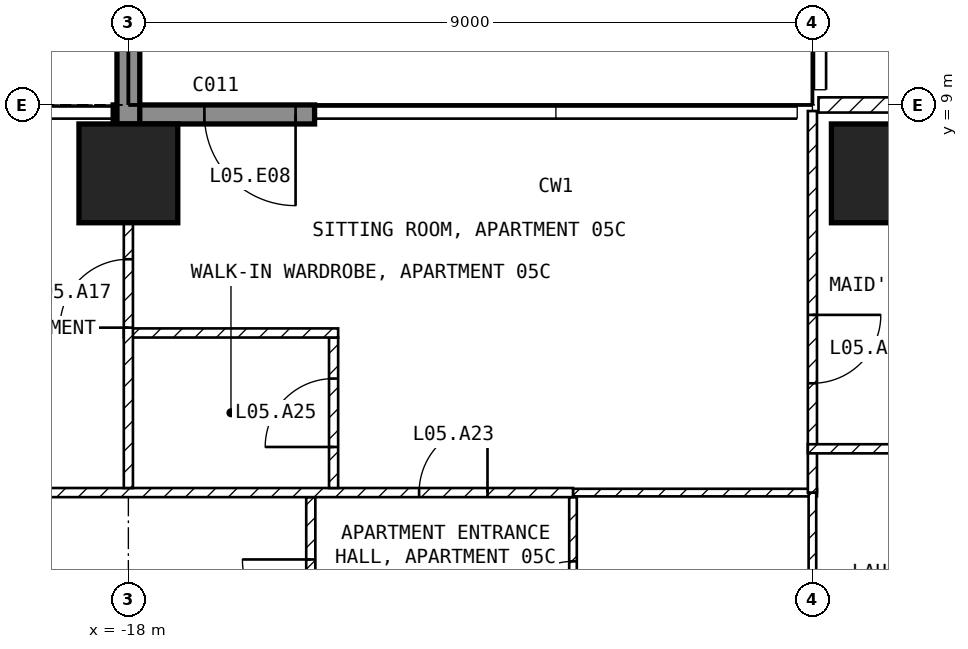
"""IFC4 building model, lengths in metres.
Left out: names, types, materials, properties, quantities, classifications, styles, units other than length and angle.
Written with IfcOpenShell. Run it as: python <this file> out.ifc"""

import sys

from ifc_helpers import new_model, si_unit, direction, frame, frame_2d, origin, origin_2d, place, context, subcontext, project, spatial, rectangle, extrude, element, fill, save


model = new_model("IFC4")
c1 = context("Model", 3, precision=1e-05, world=origin(), true_north=direction((0.0, 1.0)))
c2 = subcontext(c1, "Body", "Model", "MODEL_VIEW")
j1 = project(units=[si_unit("LENGTHUNIT", "METRE"), si_unit("PLANEANGLEUNIT", "RADIAN")], contexts=[c1])
p1 = place(None, origin())
s1 = spatial("IfcSite", under=j1, at=p1, CompositionType="ELEMENT")
p2 = place(p1, origin())
s2 = spatial("IfcBuilding", under=s1, at=p2, CompositionType="ELEMENT")
p3 = place(p2, frame((0.0, 0.0, 36.5)))
s3 = spatial("IfcBuildingStorey", under=s2, at=p3, CompositionType="ELEMENT", Elevation=36.5)
for number, where, z_axis, x_axis in (
    (1, (-18.0, 8.1, -0.25), (0.0, 0.0, 1.0), (1.0, 0.0, 0.0)),
    (2, (-8.1, 8.1, -0.25), (0.0, 0.0, 1.0), (1.0, 0.0, 0.0)),
):
    element("IfcColumn", number, at=place(p3, frame(where, z_axis=z_axis, x_axis=x_axis)), inside=s3, PredefinedType="COLUMN", context=c2, shape_type="SweptSolid", body=[
        extrude(rectangle(XDim=1.3, YDim=1.3, at=origin_2d()), origin(), (0.0, 0.0, 1.0), 3.5),
    ])
p4 = place(p3, frame((-15.55, 8.875, 0.0), z_axis=(0.0, 0.0, 1.0), x_axis=(-1.0, 0.0, 0.0)))
e3 = element("IfcWall", 3, at=p4, inside=s3, PredefinedType="SOLIDWALL", context=c2, shape_type="SweptSolid", body=[
    extrude(rectangle(XDim=2.65, YDim=0.25, at=frame_2d((1.325, 0.0))), origin(), (0.0, 0.0, 1.0), 3.25),
])
p5 = place(p4, frame((0.25, 0.0, 0.0)))
e4 = element("IfcOpeningElement", 4, at=p5, cuts=e3, PredefinedType="OPENING", context=c2, shape_type="SweptSolid", body=[
    extrude(rectangle(XDim=1.2, YDim=2.4, at=frame_2d((0.6, 1.2))), frame((0.0, 0.135, 0.0), z_axis=(0.0, -1.0, 0.0), x_axis=(1.0, 0.0, 0.0)), (0.0, 0.0, 1.0), 0.27),
])
p6 = place(p3, frame((-18.0, 8.75, 0.0), z_axis=(0.0, 0.0, 1.0), x_axis=(0.0, 1.0, 0.0)))
e5 = element("IfcWall", 5, at=p6, inside=s3, PredefinedType="SOLIDWALL", context=c2, shape_type="SweptSolid", body=[
    extrude(rectangle(XDim=2.95, YDim=0.3, at=frame_2d((1.475, 0.0))), origin(), (0.0, 0.0, 1.0), 3.25),
])
p7 = place(p3, frame((-8.92, 9.0, 0.0), z_axis=(0.0, 0.0, 1.0), x_axis=(1.0, 0.0, 0.0)))
e6 = element("IfcWall", 6, at=p7, inside=s3, PredefinedType="PARTITIONING", context=c2, shape_type="SweptSolid", body=[
    extrude(rectangle(XDim=17.84, YDim=0.2, at=frame_2d((8.92, 0.0))), origin(), (0.0, 0.0, 1.0), 3.25),
])
p8 = place(p7, frame((8.42, 0.0, 0.0)))
e7 = element("IfcOpeningElement", 7, at=p8, cuts=e6, PredefinedType="OPENING", context=c2, shape_type="SweptSolid", body=[
    extrude(rectangle(XDim=1.0, YDim=2.1, at=frame_2d((0.5, 1.05))), frame((0.0, 0.11, 0.0), z_axis=(0.0, -1.0, 0.0), x_axis=(1.0, 0.0, 0.0)), (0.0, 0.0, 1.0), 0.22),
])
p9 = place(p3, frame((-12.15, 1.3, 0.0), z_axis=(0.0, 0.0, 1.0), x_axis=(0.0, 1.0, 0.0)))
e8 = element("IfcWall", 8, at=p9, inside=s3, PredefinedType="PARTITIONING", context=c2, shape_type="SweptSolid", body=[
    extrude(rectangle(XDim=2.54, YDim=0.1, at=frame_2d((1.27, 0.0))), origin(), (0.0, 0.0, 1.0), 3.25),
])
p10 = place(p9, frame((0.845, 0.0, 0.0)))
e9 = element("IfcOpeningElement", 9, at=p10, cuts=e8, PredefinedType="OPENING", context=c2, shape_type="SweptSolid", body=[
    extrude(rectangle(XDim=0.85, YDim=2.1, at=frame_2d((0.425, 1.05))), frame((0.0, 0.06, 0.0), z_axis=(0.0, -1.0, 0.0), x_axis=(1.0, 0.0, 0.0)), (0.0, 0.0, 1.0), 0.12),
])
p11 = place(p3, frame((-12.15, 3.9, 0.0), z_axis=(0.0, 0.0, 1.0), x_axis=(1.0, 0.0, 0.0)))
e10 = element("IfcWall", 10, at=p11, inside=s3, PredefinedType="PARTITIONING", context=c2, shape_type="SweptSolid", body=[
    extrude(rectangle(XDim=3.21, YDim=0.1, at=frame_2d((1.605, 0.0))), origin(), (0.0, 0.0, 1.0), 3.25),
])
p12 = place(p3, frame((-9.0, 3.9, 0.0), z_axis=(0.0, 0.0, 1.0), x_axis=(0.0, -1.0, 0.0)))
e11 = element("IfcWall", 11, at=p12, inside=s3, PredefinedType="PARTITIONING", context=c2, shape_type="SweptSolid", body=[
    extrude(rectangle(XDim=2.6, YDim=0.1, at=frame_2d((1.3, 0.0))), origin(), (0.0, 0.0, 1.0), 3.25),
])
p13 = place(p3, frame((-15.6, 1.3, 0.0), z_axis=(0.0, 0.0, 1.0), x_axis=(0.0, 1.0, 0.0)))
e12 = element("IfcWall", 12, at=p13, inside=s3, PredefinedType="PARTITIONING", context=c2, shape_type="SweptSolid", body=[
    extrude(rectangle(XDim=2.54, YDim=0.12, at=frame_2d((1.27, 0.0))), origin(), (0.0, 0.0, 1.0), 3.25),
])
p14 = place(p13, frame((0.82, 0.0, 0.0)))
e13 = element("IfcOpeningElement", 13, at=p14, cuts=e12, PredefinedType="OPENING", context=c2, shape_type="SweptSolid", body=[
    extrude(rectangle(XDim=0.9, YDim=2.1, at=frame_2d((0.45, 1.05))), frame((0.0, 0.07, 0.0), z_axis=(0.0, -1.0, 0.0), x_axis=(1.0, 0.0, 0.0)), (0.0, 0.0, 1.0), 0.14),
])
p15 = place(p3, frame((-21.6, 3.9, 0.0), z_axis=(0.0, 0.0, 1.0), x_axis=(1.0, 0.0, 0.0)))
e14 = element("IfcWall", 14, at=p15, inside=s3, PredefinedType="PARTITIONING", context=c2, shape_type="SweptSolid", body=[
    extrude(rectangle(XDim=9.45, YDim=0.12, at=frame_2d((4.725, 0.0))), origin(), (0.0, 0.0, 1.0), 3.25),
])
p16 = place(p15, frame((7.425, 0.0, 0.0)))
e15 = element("IfcOpeningElement", 15, at=p16, cuts=e14, PredefinedType="OPENING", context=c2, shape_type="SweptSolid", body=[
    extrude(rectangle(XDim=0.9, YDim=2.1, at=frame_2d((0.45, 1.05))), frame((0.0, 0.07, 0.0), z_axis=(0.0, -1.0, 0.0), x_axis=(1.0, 0.0, 0.0)), (0.0, 0.0, 1.0), 0.14),
])
p17 = place(p15, frame((0.45, 0.0, 0.0)))
e16 = element("IfcOpeningElement", 16, at=p17, cuts=e14, PredefinedType="OPENING", context=c2, shape_type="SweptSolid", body=[
    extrude(rectangle(XDim=0.9, YDim=2.1, at=frame_2d((0.45, 1.05))), frame((0.0, 0.07, 0.0), z_axis=(0.0, -1.0, 0.0), x_axis=(1.0, 0.0, 0.0)), (0.0, 0.0, 1.0), 0.14),
])
p18 = place(p3, frame((-15.3, 3.96, 0.0), z_axis=(0.0, 0.0, 1.0), x_axis=(0.0, 1.0, 0.0)))
e17 = element("IfcWall", 17, at=p18, inside=s3, PredefinedType="PARTITIONING", context=c2, shape_type="SweptSolid", body=[
    extrude(rectangle(XDim=1.98, YDim=0.12, at=frame_2d((0.99, 0.0))), origin(), (0.0, 0.0, 1.0), 3.25),
])
p19 = place(p18, frame((0.54, 0.0, 0.0)))
e18 = element("IfcOpeningElement", 18, at=p19, cuts=e17, PredefinedType="OPENING", context=c2, shape_type="SweptSolid", body=[
    extrude(rectangle(XDim=0.9, YDim=2.1, at=frame_2d((0.45, 1.05))), frame((0.0, 0.07, 0.0), z_axis=(0.0, -1.0, 0.0), x_axis=(1.0, 0.0, 0.0)), (0.0, 0.0, 1.0), 0.14),
])
p20 = place(p3, frame((-15.24, 6.0, 0.0), z_axis=(0.0, 0.0, 1.0), x_axis=(-1.0, 0.0, 0.0)))
e19 = element("IfcWall", 19, at=p20, inside=s3, PredefinedType="PARTITIONING", context=c2, shape_type="SweptSolid", body=[
    extrude(rectangle(XDim=2.82, YDim=0.12, at=frame_2d((1.41, 0.0))), origin(), (0.0, 0.0, 1.0), 3.25),
])
p21 = place(p3, frame((-18.0, 3.96, 0.0), z_axis=(0.0, 0.0, 1.0), x_axis=(0.0, 1.0, 0.0)))
e20 = element("IfcWall", 20, at=p21, inside=s3, PredefinedType="PARTITIONING", context=c2, shape_type="SweptSolid", body=[
    extrude(rectangle(XDim=3.49, YDim=0.12, at=frame_2d((1.745, 0.0))), origin(), (0.0, 0.0, 1.0), 2.346),
])
p22 = place(p21, frame((2.11, 0.0, 0.0)))
e21 = element("IfcOpeningElement", 21, at=p22, cuts=e20, PredefinedType="OPENING", context=c2, shape_type="SweptSolid", body=[
    extrude(rectangle(XDim=0.9, YDim=2.1, at=frame_2d((0.45, 1.05))), frame((0.0, 0.07, 0.0), z_axis=(0.0, -1.0, 0.0), x_axis=(1.0, 0.0, 0.0)), (0.0, 0.0, 1.0), 0.14),
])
p23 = place(p3, frame((-9.0, 8.92, 0.0), z_axis=(0.0, 0.0, 1.0), x_axis=(0.0, -1.0, 0.0)))
e22 = element("IfcWall", 22, at=p23, inside=s3, PredefinedType="PARTITIONING", context=c2, shape_type="SweptSolid", body=[
    extrude(rectangle(XDim=5.02, YDim=0.12, at=frame_2d((2.51, 0.0))), origin(), (0.0, 0.0, 1.0), 3.25),
])
p24 = place(p23, frame((2.682, 0.0, 0.0)))
e23 = element("IfcOpeningElement", 23, at=p24, cuts=e22, PredefinedType="OPENING", context=c2, shape_type="SweptSolid", body=[
    extrude(rectangle(XDim=0.9, YDim=2.1, at=frame_2d((0.45, 1.05))), frame((0.0, 0.07, 0.0), z_axis=(0.0, -1.0, 0.0), x_axis=(1.0, 0.0, 0.0)), (0.0, 0.0, 1.0), 0.14),
])
p25 = place(p3, frame((-9.06, 4.476, 0.0), z_axis=(0.0, 0.0, 1.0), x_axis=(1.0, 0.0, 0.0)))
e24 = element("IfcWall", 24, at=p25, inside=s3, PredefinedType="PARTITIONING", context=c2, shape_type="SweptSolid", body=[
    extrude(rectangle(XDim=4.62, YDim=0.12, at=frame_2d((2.31, 0.0))), origin(), (0.0, 0.0, 1.0), 3.25),
])
p26 = place(p25, frame((1.86, 0.0, 0.0)))
e25 = element("IfcOpeningElement", 25, at=p26, cuts=e24, PredefinedType="OPENING", context=c2, shape_type="SweptSolid", body=[
    extrude(rectangle(XDim=0.9, YDim=2.1, at=frame_2d((0.45, 1.05))), frame((0.0, 0.07, 0.0), z_axis=(0.0, -1.0, 0.0), x_axis=(1.0, 0.0, 0.0)), (0.0, 0.0, 1.0), 0.14),
])
p27 = place(p5, origin())
e26 = element("IfcDoor", 26, at=p27, inside=s3, OperationType="SINGLE_SWING_LEFT", PredefinedType="DOOR", context=c2, shape_type="SweptSolid", body=[
    extrude(rectangle(XDim=1.2, YDim=2.4, at=frame_2d((0.6, 1.2))), frame((0.0, 0.025, 0.0), z_axis=(0.0, -1.0, 0.0), x_axis=(1.0, 0.0, 0.0)), (0.0, 0.0, 1.0), 0.05),
])
fill(e4, e26)
p28 = place(p22, origin())
e27 = element("IfcDoor", 27, at=p28, inside=s3, OperationType="SINGLE_SWING_LEFT", PredefinedType="DOOR", context=c2, shape_type="SweptSolid", body=[
    extrude(rectangle(XDim=0.9, YDim=2.1, at=frame_2d((0.45, 1.05))), frame((0.0, 0.025, 0.0), z_axis=(0.0, -1.0, 0.0), x_axis=(1.0, 0.0, 0.0)), (0.0, 0.0, 1.0), 0.05),
])
fill(e21, e27)
p29 = place(p14, origin())
e28 = element("IfcDoor", 28, at=p29, inside=s3, OperationType="SINGLE_SWING_RIGHT", PredefinedType="DOOR", context=c2, shape_type="SweptSolid", body=[
    extrude(rectangle(XDim=0.9, YDim=2.1, at=frame_2d((0.45, 1.05))), frame((0.0, 0.025, 0.0), z_axis=(0.0, -1.0, 0.0), x_axis=(1.0, 0.0, 0.0)), (0.0, 0.0, 1.0), 0.05),
])
fill(e13, e28)
p30 = place(p24, origin())
e29 = element("IfcDoor", 29, at=p30, inside=s3, OperationType="SINGLE_SWING_LEFT", PredefinedType="DOOR", context=c2, shape_type="SweptSolid", body=[
    extrude(rectangle(XDim=0.9, YDim=2.1, at=frame_2d((0.45, 1.05))), frame((0.0, 0.025, 0.0), z_axis=(0.0, -1.0, 0.0), x_axis=(1.0, 0.0, 0.0)), (0.0, 0.0, 1.0), 0.05),
])
fill(e23, e29)
p31 = place(p10, origin())
e30 = element("IfcDoor", 30, at=p31, inside=s3, OperationType="SINGLE_SWING_LEFT", PredefinedType="DOOR", context=c2, shape_type="SweptSolid", body=[
    extrude(rectangle(XDim=0.85, YDim=2.1, at=frame_2d((0.425, 1.05))), frame((0.0, 0.025, 0.0), z_axis=(0.0, -1.0, 0.0), x_axis=(1.0, 0.0, 0.0)), (0.0, 0.0, 1.0), 0.05),
])
fill(e9, e30)
p32 = place(p16, origin())
e31 = element("IfcDoor", 31, at=p32, inside=s3, OperationType="SINGLE_SWING_RIGHT", PredefinedType="DOOR", context=c2, shape_type="SweptSolid", body=[
    extrude(rectangle(XDim=0.9, YDim=2.1, at=frame_2d((0.45, 1.05))), frame((0.0, 0.025, 0.0), z_axis=(0.0, -1.0, 0.0), x_axis=(1.0, 0.0, 0.0)), (0.0, 0.0, 1.0), 0.05),
])
fill(e15, e31)
p33 = place(p19, origin())
e32 = element("IfcDoor", 32, at=p33, inside=s3, OperationType="SINGLE_SWING_LEFT", PredefinedType="DOOR", context=c2, shape_type="SweptSolid", body=[
    extrude(rectangle(XDim=0.9, YDim=2.1, at=frame_2d((0.45, 1.05))), frame((0.0, 0.025, 0.0), z_axis=(0.0, -1.0, 0.0), x_axis=(1.0, 0.0, 0.0)), (0.0, 0.0, 1.0), 0.05),
])
fill(e18, e32)
save(model, sys.argv[1])
